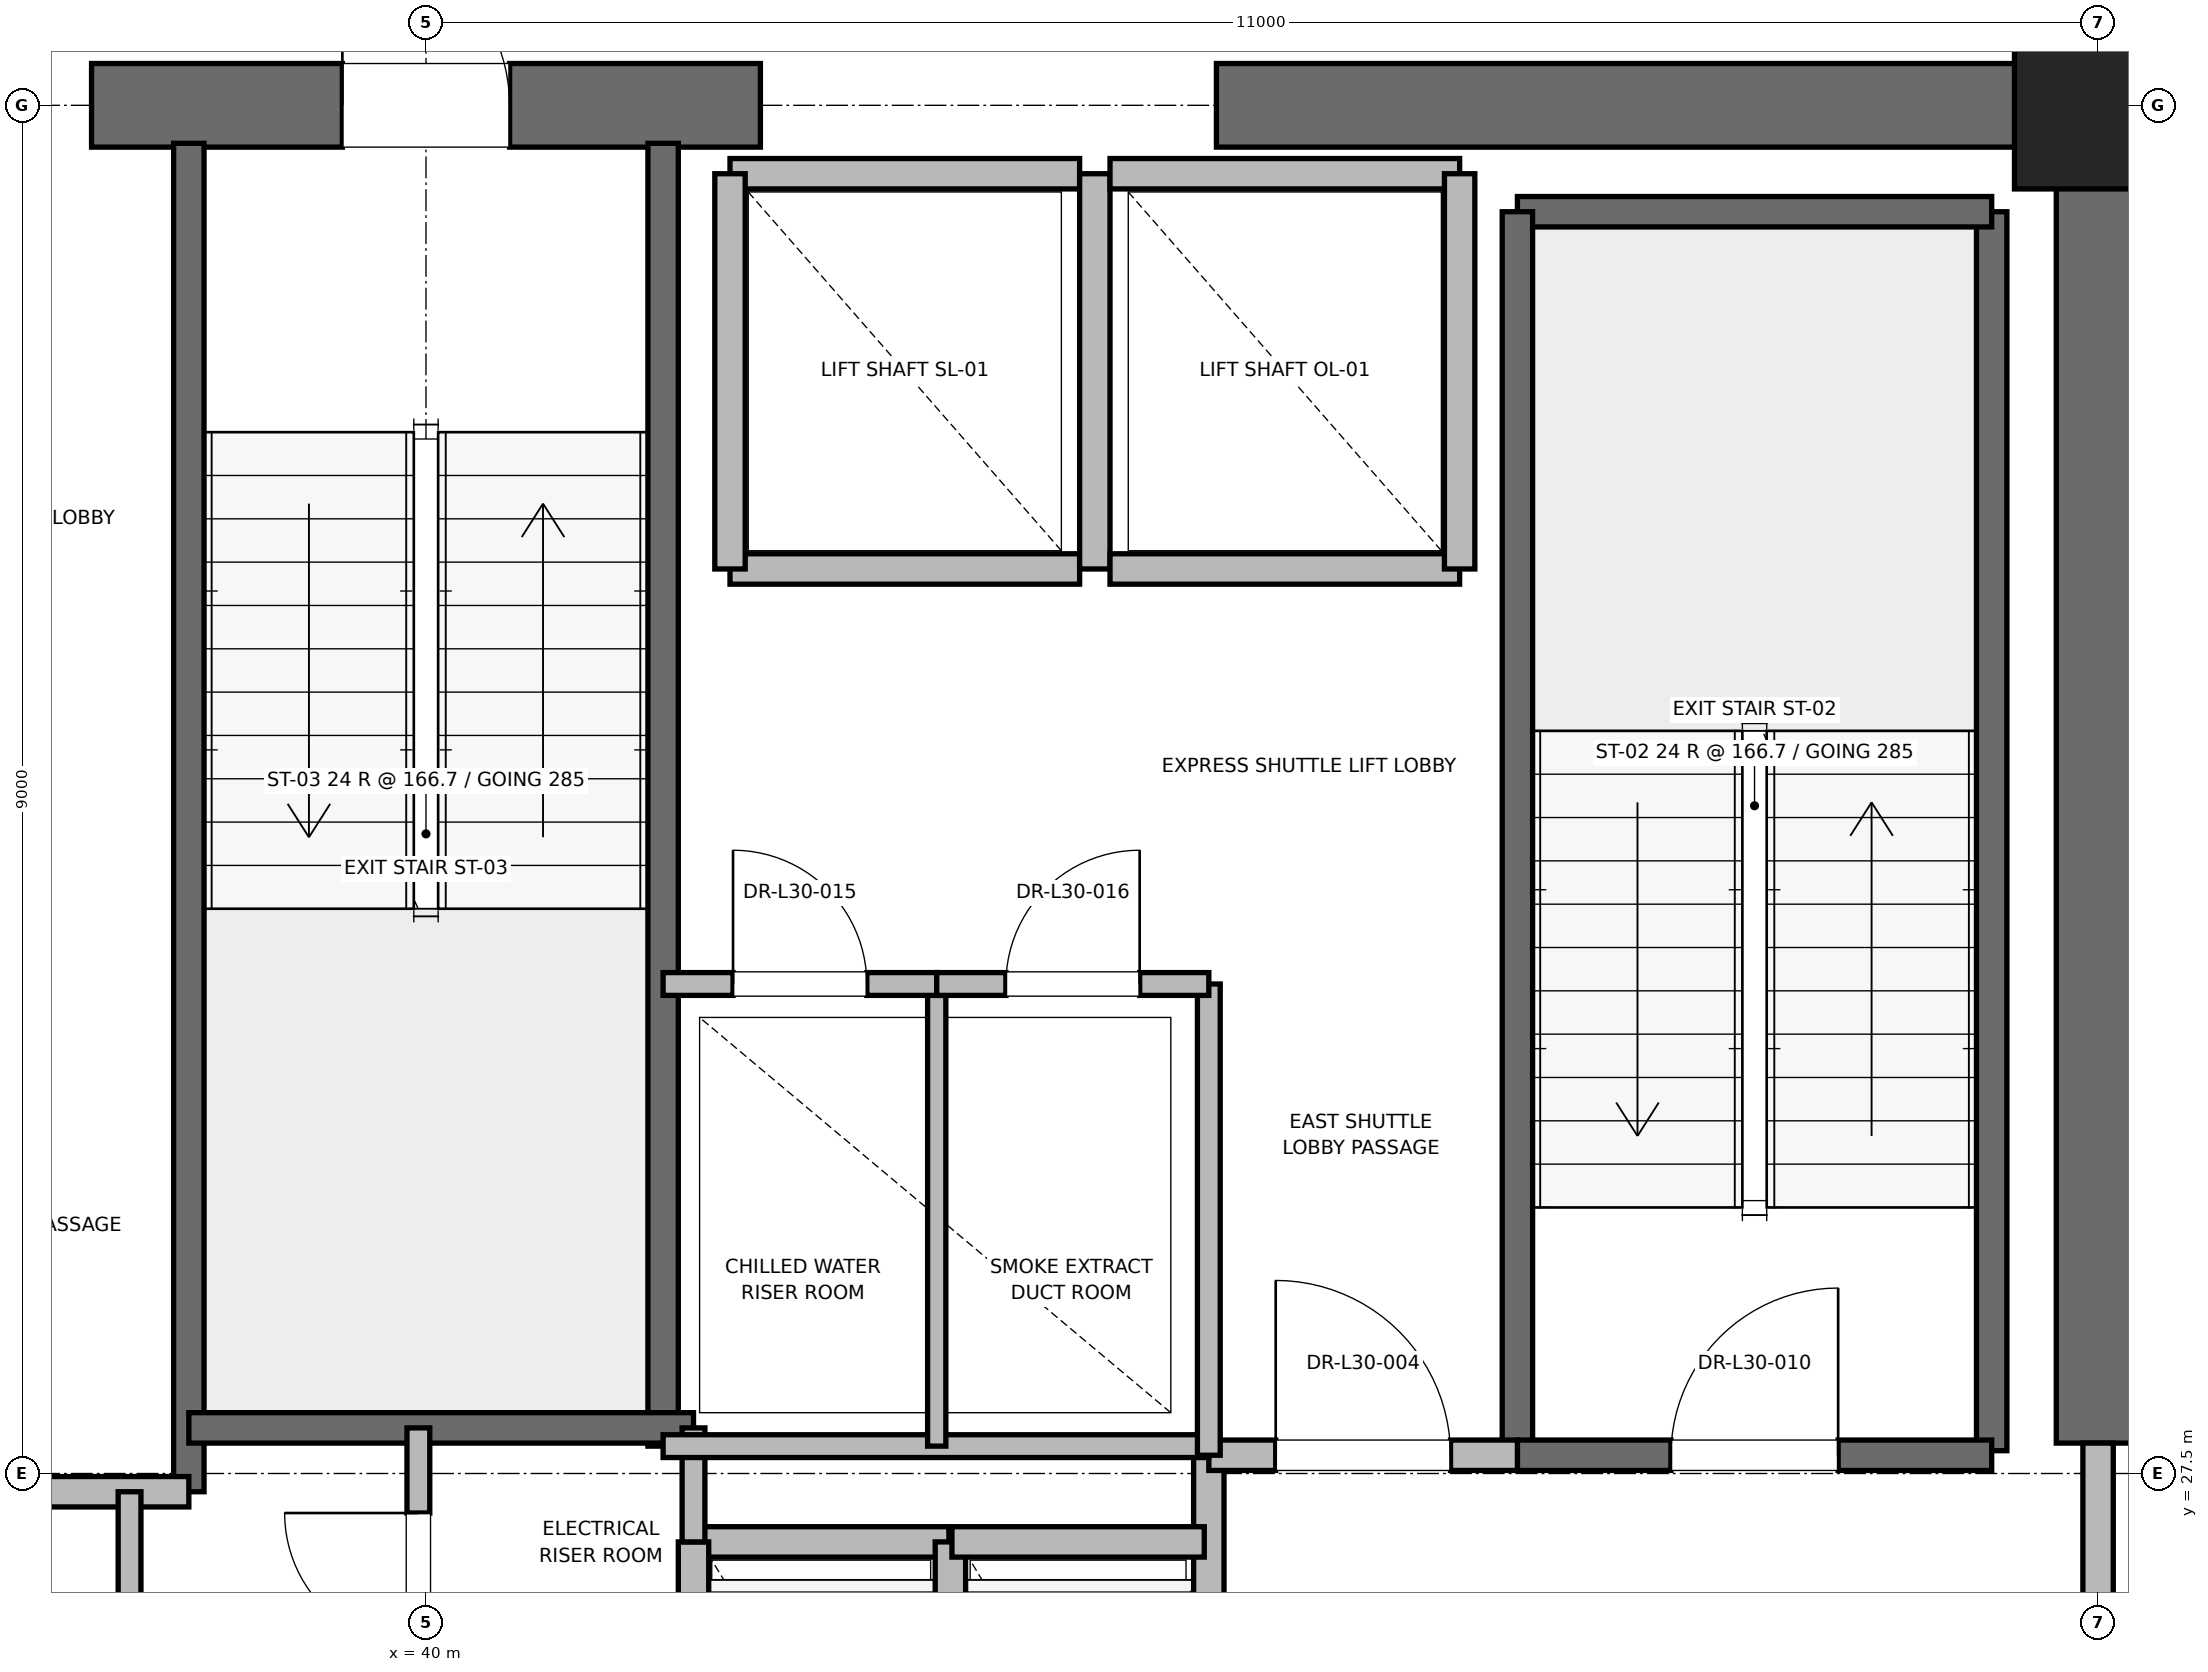
"""IFC4 building model, lengths in metres.
Left out: names, types, materials, properties, quantities, classifications, styles, units other than length and angle.
Written with IfcOpenShell. Run it as: python <this file> out.ifc"""

import sys

from ifc_helpers import new_model, si_unit, direction, frame, frame_2d, origin, origin_2d, place, context, subcontext, project, spatial, rectangle, extrude, element, fill, save


model = new_model("IFC4")
c1 = context("Model", 3, precision=1e-05, world=origin(), true_north=direction((0.0, 1.0)))
c2 = subcontext(c1, "Body", "Model", "MODEL_VIEW")
j1 = project(units=[si_unit("LENGTHUNIT", "METRE"), si_unit("PLANEANGLEUNIT", "RADIAN")], contexts=[c1])
p1 = place(None, origin())
s1 = spatial("IfcSite", under=j1, at=p1, CompositionType="ELEMENT")
p2 = place(p1, origin())
s2 = spatial("IfcBuilding", under=s1, at=p2, CompositionType="ELEMENT")
p3 = place(p2, frame((0.0, 0.0, 132.4)))
s3 = spatial("IfcBuildingStorey", under=s2, at=p3, CompositionType="ELEMENT", Elevation=132.4)
p4 = place(p3, frame((51.0, 36.5, 0.0), z_axis=(0.0, 0.0, 1.0), x_axis=(1.0, 0.0, 0.0)))
e1 = element("IfcColumn", 1, at=p4, inside=s3, PredefinedType="PILASTER", context=c2, shape_type="SweptSolid", body=[
    extrude(rectangle(XDim=1.1, YDim=1.1, at=origin_2d()), origin(), (0.0, 0.0, 1.0), 4.0),
])
p5 = place(p3, frame((37.8, 36.5, 0.0), z_axis=(0.0, 0.0, 1.0), x_axis=(1.0, 0.0, 0.0)))
e2 = element("IfcWall", 2, at=p5, inside=s3, PredefinedType="SHEAR", context=c2, shape_type="SweptSolid", body=[
    extrude(rectangle(XDim=4.4, YDim=0.55, at=frame_2d((2.2, 0.0))), origin(), (0.0, 0.0, 1.0), 3.775),
])
p6 = place(p5, frame((1.65, 0.0, 0.0)))
e3 = element("IfcOpeningElement", 3, at=p6, cuts=e2, PredefinedType="OPENING", context=c2, shape_type="SweptSolid", body=[
    extrude(rectangle(XDim=1.1, YDim=2.15, at=frame_2d((0.55, 1.075))), frame((0.0, 0.275, 0.0), z_axis=(0.0, -1.0, 0.0), x_axis=(1.0, 0.0, 0.0)), (0.0, 0.0, 1.0), 0.55),
])
p7 = place(p3, frame((45.2, 36.5, 0.0), z_axis=(0.0, 0.0, 1.0), x_axis=(1.0, 0.0, 0.0)))
e4 = element("IfcWall", 4, at=p7, inside=s3, PredefinedType="SHEAR", context=c2, shape_type="SweptSolid", body=[
    extrude(rectangle(XDim=5.8, YDim=0.55, at=frame_2d((2.9, 0.0))), origin(), (0.0, 0.0, 1.0), 3.775),
])
p8 = place(p3, frame((51.0, 27.7, 0.0), z_axis=(0.0, 0.0, 1.0), x_axis=(0.0, 1.0, 0.0)))
e5 = element("IfcWall", 5, at=p8, inside=s3, PredefinedType="SHEAR", context=c2, shape_type="SweptSolid", body=[
    extrude(rectangle(XDim=8.8, YDim=0.55, at=frame_2d((4.4, 0.0))), origin(), (0.0, 0.0, 1.0), 3.775),
])
p9 = place(p3, frame((50.3, 27.65, 0.0), z_axis=(0.0, 0.0, 1.0), x_axis=(0.0, 1.0, 0.0)))
e6 = element("IfcWall", 6, at=p9, inside=s3, PredefinedType="SOLIDWALL", context=c2, shape_type="SweptSolid", body=[
    extrude(rectangle(XDim=8.15, YDim=0.2, at=frame_2d((4.075, 0.0))), origin(), (0.0, 0.0, 1.0), 3.775),
])
p10 = place(p3, frame((47.18, 35.8, 0.0), z_axis=(0.0, 0.0, 1.0), x_axis=(1.0, 0.0, 0.0)))
e7 = element("IfcWall", 7, at=p10, inside=s3, PredefinedType="SOLIDWALL", context=c2, shape_type="SweptSolid", body=[
    extrude(rectangle(XDim=3.12, YDim=0.2, at=frame_2d((1.56, 0.0))), origin(), (0.0, 0.0, 1.0), 3.775),
])
p11 = place(p3, frame((47.18, 27.62, 0.0), z_axis=(0.0, 0.0, 1.0), x_axis=(0.0, 1.0, 0.0)))
e8 = element("IfcWall", 8, at=p11, inside=s3, PredefinedType="SOLIDWALL", context=c2, shape_type="SweptSolid", body=[
    extrude(rectangle(XDim=8.18, YDim=0.2, at=frame_2d((4.09, 0.0))), origin(), (0.0, 0.0, 1.0), 3.775),
])
p12 = place(p3, frame((47.18, 27.62, 0.0), z_axis=(0.0, 0.0, 1.0), x_axis=(1.0, 0.0, 0.0)))
e9 = element("IfcWall", 9, at=p12, inside=s3, PredefinedType="SOLIDWALL", context=c2, shape_type="SweptSolid", body=[
    extrude(rectangle(XDim=3.12, YDim=0.2, at=frame_2d((1.56, 0.0))), origin(), (0.0, 0.0, 1.0), 3.775),
])
p13 = place(p12, frame((1.01, 0.0, 0.0)))
e10 = element("IfcOpeningElement", 10, at=p13, cuts=e9, PredefinedType="OPENING", context=c2, shape_type="SweptSolid", body=[
    extrude(rectangle(XDim=1.1, YDim=2.15, at=frame_2d((0.55, 1.075))), frame((0.0, 0.1, 0.0), z_axis=(0.0, -1.0, 0.0), x_axis=(1.0, 0.0, 0.0)), (0.0, 0.0, 1.0), 0.2),
])
p14 = place(p3, frame((38.44, 27.38, 0.0), z_axis=(0.0, 0.0, 1.0), x_axis=(0.0, 1.0, 0.0)))
e11 = element("IfcWall", 11, at=p14, inside=s3, PredefinedType="SOLIDWALL", context=c2, shape_type="SweptSolid", body=[
    extrude(rectangle(XDim=8.87, YDim=0.2, at=frame_2d((4.435, 0.0))), origin(), (0.0, 0.0, 1.0), 3.775),
])
p15 = place(p3, frame((41.56, 27.68, 0.0), z_axis=(0.0, 0.0, 1.0), x_axis=(0.0, 1.0, 0.0)))
e12 = element("IfcWall", 12, at=p15, inside=s3, PredefinedType="SOLIDWALL", context=c2, shape_type="SweptSolid", body=[
    extrude(rectangle(XDim=8.57, YDim=0.2, at=frame_2d((4.285, 0.0))), origin(), (0.0, 0.0, 1.0), 3.775),
])
p16 = place(p3, frame((38.44, 27.8, 0.0), z_axis=(0.0, 0.0, 1.0), x_axis=(1.0, 0.0, 0.0)))
e13 = element("IfcWall", 13, at=p16, inside=s3, PredefinedType="SOLIDWALL", context=c2, shape_type="SweptSolid", body=[
    extrude(rectangle(XDim=3.32, YDim=0.2, at=frame_2d((1.66, 0.0))), origin(), (0.0, 0.0, 1.0), 3.775),
])
p17 = place(p3, frame((32.82, 27.38, 0.0), z_axis=(0.0, 0.0, 1.0), x_axis=(1.0, 0.0, 0.0)))
e14 = element("IfcWall", 14, at=p17, inside=s3, PredefinedType="PARTITIONING", context=c2, shape_type="SweptSolid", body=[
    extrude(rectangle(XDim=5.62, YDim=0.2, at=frame_2d((2.81, 0.0))), origin(), (0.0, 0.0, 1.0), 3.775),
])
p18 = place(p3, frame((45.15, 24.25, 0.0), z_axis=(0.0, 0.0, 1.0), x_axis=(0.0, 1.0, 0.0)))
e15 = element("IfcWall", 15, at=p18, inside=s3, PredefinedType="PARTITIONING", context=c2, shape_type="SweptSolid", body=[
    extrude(rectangle(XDim=3.37, YDim=0.2, at=frame_2d((1.685, 0.0))), origin(), (0.0, 0.0, 1.0), 3.775),
])
p19 = place(p3, frame((45.15, 27.62, 0.0), z_axis=(0.0, 0.0, 1.0), x_axis=(1.0, 0.0, 0.0)))
e16 = element("IfcWall", 16, at=p19, inside=s3, PredefinedType="PARTITIONING", context=c2, shape_type="SweptSolid", body=[
    extrude(rectangle(XDim=2.03, YDim=0.2, at=frame_2d((1.015, 0.0))), origin(), (0.0, 0.0, 1.0), 3.775),
])
p20 = place(p19, frame((0.44, 0.0, 0.0)))
e17 = element("IfcOpeningElement", 17, at=p20, cuts=e16, PredefinedType="OPENING", context=c2, shape_type="SweptSolid", body=[
    extrude(rectangle(XDim=1.15, YDim=2.2, at=frame_2d((0.575, 1.1))), frame((0.0, 0.1, 0.0), z_axis=(0.0, -1.0, 0.0), x_axis=(1.0, 0.0, 0.0)), (0.0, 0.0, 1.0), 0.2),
])
p21 = place(p3, frame((51.0, 24.3, 0.0), z_axis=(0.0, 0.0, 1.0), x_axis=(0.0, 1.0, 0.0)))
e18 = element("IfcWall", 18, at=p21, inside=s3, PredefinedType="PARTITIONING", context=c2, shape_type="SweptSolid", body=[
    extrude(rectangle(XDim=3.4, YDim=0.2, at=frame_2d((1.7, 0.0))), origin(), (0.0, 0.0, 1.0), 2.755),
])
p22 = place(p21, frame((1.125, 0.0, 0.0)))
e19 = element("IfcOpeningElement", 19, at=p22, cuts=e18, PredefinedType="OPENING", context=c2, shape_type="SweptSolid", body=[
    extrude(rectangle(XDim=1.15, YDim=2.2, at=frame_2d((0.575, 1.1))), frame((0.0, 0.1, 0.0), z_axis=(0.0, -1.0, 0.0), x_axis=(1.0, 0.0, 0.0)), (0.0, 0.0, 1.0), 0.2),
])
p23 = place(p3, frame((43.44, 27.05, 0.0), z_axis=(0.0, 0.0, 1.0), x_axis=(-1.0, 0.0, 0.0)))
e20 = element("IfcWall", 20, at=p23, inside=s3, PredefinedType="SOLIDWALL", context=c2, shape_type="SweptSolid", body=[
    extrude(rectangle(XDim=1.68, YDim=0.2, at=frame_2d((0.84, 0.0))), origin(), (0.0, 0.0, 1.0), 3.775),
])
for number, where, z_axis, x_axis in (
    (21, (41.76, 27.05, 0.0), (0.0, 0.0, 1.0), (0.0, -1.0, 0.0)),
    (22, (43.45, 24.45, 0.0), (0.0, 0.0, 1.0), (0.0, 1.0, 0.0)),
):
    element("IfcWall", number, at=place(p3, frame(where, z_axis=z_axis, x_axis=x_axis)), inside=s3, PredefinedType="SOLIDWALL", context=c2, shape_type="SweptSolid", body=[
        extrude(rectangle(XDim=2.6, YDim=0.2, at=frame_2d((1.3, 0.0))), origin(), (0.0, 0.0, 1.0), 3.775),
    ])
p24 = place(p3, frame((45.12, 27.05, 0.0), z_axis=(0.0, 0.0, 1.0), x_axis=(-1.0, 0.0, 0.0)))
e23 = element("IfcWall", 23, at=p24, inside=s3, PredefinedType="SOLIDWALL", context=c2, shape_type="SweptSolid", body=[
    extrude(rectangle(XDim=1.66, YDim=0.2, at=frame_2d((0.83, 0.0))), origin(), (0.0, 0.0, 1.0), 3.775),
])
p25 = place(p3, frame((42.0, 33.45, 0.0), z_axis=(0.0, 0.0, 1.0), x_axis=(1.0, 0.0, 0.0)))
e24 = element("IfcWall", 24, at=p25, inside=s3, PredefinedType="SOLIDWALL", context=c2, shape_type="SweptSolid", body=[
    extrude(rectangle(XDim=2.3, YDim=0.2, at=frame_2d((1.15, 0.0))), origin(), (0.0, 0.0, 1.0), 3.775),
])
p26 = place(p3, frame((44.3, 36.05, 0.0), z_axis=(0.0, 0.0, 1.0), x_axis=(-1.0, 0.0, 0.0)))
e25 = element("IfcWall", 25, at=p26, inside=s3, PredefinedType="SOLIDWALL", context=c2, shape_type="SweptSolid", body=[
    extrude(rectangle(XDim=2.3, YDim=0.2, at=frame_2d((1.15, 0.0))), origin(), (0.0, 0.0, 1.0), 2.755),
])
for number, where, z_axis, x_axis in (
    (26, (42.0, 36.05, 0.0), (0.0, 0.0, 1.0), (0.0, -1.0, 0.0)),
    (27, (44.4, 33.45, 0.0), (0.0, 0.0, 1.0), (0.0, 1.0, 0.0)),
):
    element("IfcWall", number, at=place(p3, frame(where, z_axis=z_axis, x_axis=x_axis)), inside=s3, PredefinedType="SOLIDWALL", context=c2, shape_type="SweptSolid", body=[
        extrude(rectangle(XDim=2.6, YDim=0.2, at=frame_2d((1.3, 0.0))), origin(), (0.0, 0.0, 1.0), 2.755),
    ])
p27 = place(p3, frame((44.5, 33.45, 0.0), z_axis=(0.0, 0.0, 1.0), x_axis=(1.0, 0.0, 0.0)))
e28 = element("IfcWall", 28, at=p27, inside=s3, PredefinedType="SOLIDWALL", context=c2, shape_type="SweptSolid", body=[
    extrude(rectangle(XDim=2.3, YDim=0.2, at=frame_2d((1.15, 0.0))), origin(), (0.0, 0.0, 1.0), 3.775),
])
p28 = place(p3, frame((46.8, 36.05, 0.0), z_axis=(0.0, 0.0, 1.0), x_axis=(-1.0, 0.0, 0.0)))
e29 = element("IfcWall", 29, at=p28, inside=s3, PredefinedType="SOLIDWALL", context=c2, shape_type="SweptSolid", body=[
    extrude(rectangle(XDim=2.3, YDim=0.2, at=frame_2d((1.15, 0.0))), origin(), (0.0, 0.0, 1.0), 2.755),
])
p29 = place(p3, frame((46.8, 33.45, 0.0), z_axis=(0.0, 0.0, 1.0), x_axis=(0.0, 1.0, 0.0)))
e30 = element("IfcWall", 30, at=p29, inside=s3, PredefinedType="SOLIDWALL", context=c2, shape_type="SweptSolid", body=[
    extrude(rectangle(XDim=2.6, YDim=0.2, at=frame_2d((1.3, 0.0))), origin(), (0.0, 0.0, 1.0), 3.775),
])
p30 = place(p3, frame((41.76, 27.05, 0.0), z_axis=(0.0, 0.0, 1.0), x_axis=(0.0, 1.0, 0.0)))
e31 = element("IfcWall", 31, at=p30, inside=s3, PredefinedType="PARTITIONING", context=c2, shape_type="SweptSolid", body=[
    extrude(rectangle(XDim=0.75, YDim=0.15, at=frame_2d((0.375, 0.0))), origin(), (0.0, 0.0, 1.0), 2.85),
])
p31 = place(p3, frame((39.95, 25.8, 0.0), z_axis=(0.0, 0.0, 1.0), x_axis=(0.0, 1.0, 0.0)))
e32 = element("IfcWall", 32, at=p31, inside=s3, PredefinedType="PARTITIONING", context=c2, shape_type="SweptSolid", body=[
    extrude(rectangle(XDim=2.0, YDim=0.15, at=frame_2d((1.0, 0.0))), origin(), (0.0, 0.0, 1.0), 2.85),
])
p32 = place(p31, frame((0.56, 0.0, 0.0)))
e33 = element("IfcOpeningElement", 33, at=p32, cuts=e32, PredefinedType="OPENING", context=c2, shape_type="SweptSolid", body=[
    extrude(rectangle(XDim=0.88, YDim=2.1, at=frame_2d((0.44, 1.05))), frame((0.0, 0.075, 0.0), z_axis=(0.0, -1.0, 0.0), x_axis=(1.0, 0.0, 0.0)), (0.0, 0.0, 1.0), 0.15),
])
p33 = place(p3, frame((38.05, 23.06, 0.0), z_axis=(0.0, 0.0, 1.0), x_axis=(0.0, 1.0, 0.0)))
e34 = element("IfcWall", 34, at=p33, inside=s3, PredefinedType="PARTITIONING", context=c2, shape_type="SweptSolid", body=[
    extrude(rectangle(XDim=4.32, YDim=0.15, at=frame_2d((2.16, 0.0))), origin(), (0.0, 0.0, 1.0), 2.85),
])
p34 = place(p33, frame((1.66, 0.0, 0.0)))
e35 = element("IfcOpeningElement", 35, at=p34, cuts=e34, PredefinedType="OPENING", context=c2, shape_type="SweptSolid", body=[
    extrude(rectangle(XDim=1.0, YDim=2.15, at=frame_2d((0.5, 1.075))), frame((0.0, 0.075, 0.0), z_axis=(0.0, -1.0, 0.0), x_axis=(1.0, 0.0, 0.0)), (0.0, 0.0, 1.0), 0.15),
])
p35 = place(p3, frame((41.56, 27.68, 0.0), z_axis=(0.0, 0.0, 1.0), x_axis=(1.0, 0.0, 0.0)))
e36 = element("IfcWall", 36, at=p35, inside=s3, PredefinedType="PARTITIONING", context=c2, shape_type="SweptSolid", body=[
    extrude(rectangle(XDim=3.59, YDim=0.15, at=frame_2d((1.795, 0.0))), origin(), (0.0, 0.0, 1.0), 2.85),
])
p36 = place(p3, frame((45.15, 27.62, 0.0), z_axis=(0.0, 0.0, 1.0), x_axis=(0.0, 1.0, 0.0)))
e37 = element("IfcWall", 37, at=p36, inside=s3, PredefinedType="PARTITIONING", context=c2, shape_type="SweptSolid", body=[
    extrude(rectangle(XDim=3.1, YDim=0.15, at=frame_2d((1.55, 0.0))), origin(), (0.0, 0.0, 1.0), 2.85),
])
p37 = place(p3, frame((43.36, 27.68, 0.0), z_axis=(0.0, 0.0, 1.0), x_axis=(0.0, 1.0, 0.0)))
e38 = element("IfcWall", 38, at=p37, inside=s3, PredefinedType="PARTITIONING", context=c2, shape_type="SweptSolid", body=[
    extrude(rectangle(XDim=3.04, YDim=0.12, at=frame_2d((1.52, 0.0))), origin(), (0.0, 0.0, 1.0), 2.85),
])
p38 = place(p3, frame((41.56, 30.72, 0.0), z_axis=(0.0, 0.0, 1.0), x_axis=(1.0, 0.0, 0.0)))
e39 = element("IfcWall", 39, at=p38, inside=s3, PredefinedType="PARTITIONING", context=c2, shape_type="SweptSolid", body=[
    extrude(rectangle(XDim=1.8, YDim=0.15, at=frame_2d((0.9, 0.0))), origin(), (0.0, 0.0, 1.0), 2.85),
])
p39 = place(p38, frame((0.46, 0.0, 0.0)))
e40 = element("IfcOpeningElement", 40, at=p39, cuts=e39, PredefinedType="OPENING", context=c2, shape_type="SweptSolid", body=[
    extrude(rectangle(XDim=0.88, YDim=2.1, at=frame_2d((0.44, 1.05))), frame((0.0, 0.075, 0.0), z_axis=(0.0, -1.0, 0.0), x_axis=(1.0, 0.0, 0.0)), (0.0, 0.0, 1.0), 0.15),
])
p40 = place(p3, frame((43.36, 30.72, 0.0), z_axis=(0.0, 0.0, 1.0), x_axis=(1.0, 0.0, 0.0)))
e41 = element("IfcWall", 41, at=p40, inside=s3, PredefinedType="PARTITIONING", context=c2, shape_type="SweptSolid", body=[
    extrude(rectangle(XDim=1.79, YDim=0.15, at=frame_2d((0.895, 0.0))), origin(), (0.0, 0.0, 1.0), 2.85),
])
p41 = place(p40, frame((0.455, 0.0, 0.0)))
e42 = element("IfcOpeningElement", 42, at=p41, cuts=e41, PredefinedType="OPENING", context=c2, shape_type="SweptSolid", body=[
    extrude(rectangle(XDim=0.88, YDim=2.1, at=frame_2d((0.44, 1.05))), frame((0.0, 0.075, 0.0), z_axis=(0.0, -1.0, 0.0), x_axis=(1.0, 0.0, 0.0)), (0.0, 0.0, 1.0), 0.15),
])
p42 = place(p13, origin())
e43 = element("IfcDoor", 43, at=p42, inside=s3, OperationType="SINGLE_SWING_RIGHT", PredefinedType="DOOR", context=c2, shape_type="SweptSolid", body=[
    extrude(rectangle(XDim=1.1, YDim=2.15, at=frame_2d((0.55, 1.075))), frame((0.0, 0.025, 0.0), z_axis=(0.0, -1.0, 0.0), x_axis=(1.0, 0.0, 0.0)), (0.0, 0.0, 1.0), 0.05),
])
fill(e10, e43)
p43 = place(p6, origin())
e44 = element("IfcDoor", 44, at=p43, inside=s3, OperationType="SINGLE_SWING_LEFT", PredefinedType="DOOR", context=c2, shape_type="SweptSolid", body=[
    extrude(rectangle(XDim=1.1, YDim=2.15, at=frame_2d((0.55, 1.075))), frame((0.0, 0.025, 0.0), z_axis=(0.0, -1.0, 0.0), x_axis=(1.0, 0.0, 0.0)), (0.0, 0.0, 1.0), 0.05),
])
fill(e3, e44)
p44 = place(p20, origin())
e45 = element("IfcDoor", 45, at=p44, inside=s3, OperationType="SINGLE_SWING_LEFT", PredefinedType="DOOR", context=c2, shape_type="SweptSolid", body=[
    extrude(rectangle(XDim=1.15, YDim=2.2, at=frame_2d((0.575, 1.1))), frame((0.0, 0.025, 0.0), z_axis=(0.0, -1.0, 0.0), x_axis=(1.0, 0.0, 0.0)), (0.0, 0.0, 1.0), 0.05),
])
fill(e17, e45)
p45 = place(p32, origin())
e46 = element("IfcDoor", 46, at=p45, inside=s3, OperationType="SINGLE_SWING_RIGHT", PredefinedType="DOOR", context=c2, shape_type="SweptSolid", body=[
    extrude(rectangle(XDim=0.88, YDim=2.1, at=frame_2d((0.44, 1.05))), frame((0.0, 0.025, 0.0), z_axis=(0.0, -1.0, 0.0), x_axis=(1.0, 0.0, 0.0)), (0.0, 0.0, 1.0), 0.05),
])
fill(e33, e46)
p46 = place(p39, origin())
e47 = element("IfcDoor", 47, at=p46, inside=s3, OperationType="SINGLE_SWING_LEFT", PredefinedType="DOOR", context=c2, shape_type="SweptSolid", body=[
    extrude(rectangle(XDim=0.88, YDim=2.1, at=frame_2d((0.44, 1.05))), frame((0.0, 0.025, 0.0), z_axis=(0.0, -1.0, 0.0), x_axis=(1.0, 0.0, 0.0)), (0.0, 0.0, 1.0), 0.05),
])
fill(e40, e47)
p47 = place(p41, origin())
e48 = element("IfcDoor", 48, at=p47, inside=s3, OperationType="SINGLE_SWING_RIGHT", PredefinedType="DOOR", context=c2, shape_type="SweptSolid", body=[
    extrude(rectangle(XDim=0.88, YDim=2.1, at=frame_2d((0.44, 1.05))), frame((0.0, 0.025, 0.0), z_axis=(0.0, -1.0, 0.0), x_axis=(1.0, 0.0, 0.0)), (0.0, 0.0, 1.0), 0.05),
])
fill(e42, e48)
save(model, sys.argv[1])
